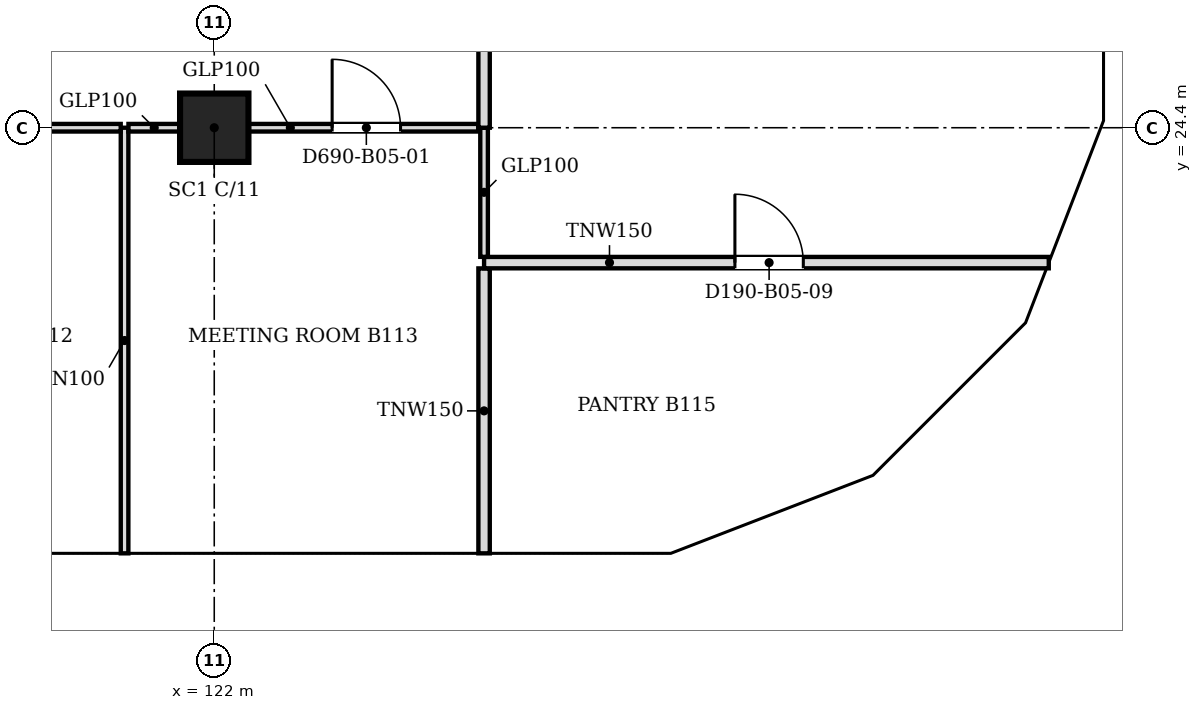
"""IFC4 building model, lengths in metres.
Left out: names, types, materials, properties, quantities, classifications, styles, units other than length and angle.
Written with IfcOpenShell. Run it as: python <this file> out.ifc"""

import sys

from ifc_helpers import new_model, si_unit, direction, frame, frame_2d, origin, origin_2d, place, context, subcontext, project, spatial, polyline, rectangle, outline, extrude, faceted_brep, source, transform, mapped, element, fill, save


model = new_model("IFC4")
c1 = context("Model", 3, precision=1e-05, world=origin(), true_north=direction((0.0, 1.0)))
c2 = subcontext(c1, "Body", "Model", "MODEL_VIEW")
j1 = project(units=[si_unit("LENGTHUNIT", "METRE"), si_unit("PLANEANGLEUNIT", "RADIAN")], contexts=[c1])
p1 = place(None, origin())
s1 = spatial("IfcSite", under=j1, at=p1, CompositionType="ELEMENT")
p2 = place(p1, origin())
s2 = spatial("IfcBuilding", under=s1, at=p2, CompositionType="ELEMENT")
p3 = place(p2, frame((0.0, 0.0, 52.4)))
s3 = spatial("IfcBuildingStorey", under=s2, at=p3, CompositionType="ELEMENT", Elevation=52.4)
p4 = place(p3, frame((122.0, 24.4, 0.0), z_axis=(0.0, 0.0, 1.0), x_axis=(1.0, 0.0, 0.0)))
e1 = element("IfcColumn", 1, at=p4, inside=s3, PredefinedType="COLUMN", context=c2, shape_type="SweptSolid", body=[
    extrude(rectangle(XDim=0.9, YDim=0.9, at=origin_2d()), origin(), (0.0, 0.0, 1.0), 3.6),
])
m1 = source(origin(), c2, "Body", "SweptSolid", [
    extrude(outline(polyline([(3.05, 0.0), (6.1, 3.8), (3.05, 7.6), (0.0, 3.8), (3.05, 0.0)])), frame((0.0, 0.25, 0.0), z_axis=(0.0, -1.0, 0.0), x_axis=(1.0, 0.0, 0.0)), (0.0, 0.0, 1.0), 0.5),
])
p5 = place(p3, frame((115.9, 18.55, -3.8), z_axis=(0.0, 0.0, 1.0), x_axis=(1.0, 0.0, 0.0)))
e2 = element("IfcWall", 2, at=p5, inside=s3, PredefinedType="SOLIDWALL", context=c2, shape_type="MappedRepresentation", body=[
    mapped(m1, transform((0.0, 0.0, 0.0), scale=1.0)),
])
m2 = source(origin(), c2, "Body", "SweptSolid", [
    extrude(outline(polyline([(3.05, 0.399), (5.78, 3.8), (3.05, 7.2), (0.321, 3.8), (3.05, 0.399)])), frame((0.0, 0.26, 0.0), z_axis=(0.0, -1.0, 0.0), x_axis=(1.0, 0.0, 0.0)), (0.0, 0.0, 1.0), 0.52),
])
p6 = place(p5, origin())
e3 = element("IfcOpeningElement", 3, at=p6, cuts=e2, PredefinedType="OPENING", context=c2, shape_type="MappedRepresentation", body=[
    mapped(m2, transform((0.0, 0.0, 0.0), scale=1.0)),
])
m3 = source(origin(), c2, "Body", "Brep", [
    faceted_brep([(3.05, -0.25, 0.0), (6.053, -0.25, 3.8), (3.05, -0.25, 7.6), (0.0, -0.25, 3.8), (0.0, 0.25, 3.8), (3.05, 0.25, 7.6), (6.007, 0.25, 3.859), (6.007, 0.25, 3.741), (3.05, 0.25, 0.0), (6.053, 0.0, 3.8)], [[[0, 1, 2, 3]], [[4, 5, 6, 7, 8]], [[8, 7, 9, 1, 0]], [[6, 5, 2, 1, 9]], [[5, 4, 3, 2]], [[4, 8, 0, 3]], [[9, 7, 6]]]),
])
p7 = place(p3, frame((122.0, 18.55, -3.8), z_axis=(0.0, 0.0, 1.0), x_axis=(1.0, 0.0, 0.0)))
e4 = element("IfcWall", 4, at=p7, inside=s3, PredefinedType="SOLIDWALL", context=c2, shape_type="MappedRepresentation", body=[
    mapped(m3, transform((0.0, 0.0, 0.0), scale=1.0)),
])
m4 = source(origin(), c2, "Body", "SweptSolid", [
    extrude(outline(polyline([(3.049, 0.401), (5.735, 3.8), (3.049, 7.199), (0.321, 3.8), (3.049, 0.401)])), frame((0.0, 0.26, 0.0), z_axis=(0.0, -1.0, 0.0), x_axis=(1.0, 0.0, 0.0)), (0.0, 0.0, 1.0), 0.52),
])
p8 = place(p7, origin())
e5 = element("IfcOpeningElement", 5, at=p8, cuts=e4, PredefinedType="OPENING", context=c2, shape_type="MappedRepresentation", body=[
    mapped(m4, transform((0.0, 0.0, 0.0), scale=1.0)),
])
m5 = source(origin(), c2, "Body", "Brep", [
    faceted_brep([(2.95, -0.25, 0.0), (3.003, -0.25, 0.068), (3.003, -0.25, 7.531), (2.95, -0.25, 7.6), (0.0, -0.25, 3.8), (0.047, 0.25, 3.86), (2.898, 0.25, 7.532), (2.898, 0.25, 0.068), (0.047, 0.25, 3.74), (2.95, 0.0, 0.0), (2.95, 0.0, 7.6), (0.0, 0.0, 3.8)], [[[0, 1, 2, 3, 4]], [[5, 6, 7, 8]], [[1, 0, 9]], [[10, 3, 2]], [[6, 5, 11, 4, 3, 10]], [[8, 7, 9, 0, 4, 11]], [[8, 11, 5]], [[1, 9, 7, 6, 10, 2]]]),
])
p9 = place(p3, frame((128.053, 18.55, -3.8), z_axis=(0.0, 0.0, 1.0), x_axis=(0.933007896601, 0.359855894603, 0.0)))
e6 = element("IfcWall", 6, at=p9, inside=s3, PredefinedType="SOLIDWALL", context=c2, shape_type="MappedRepresentation", body=[
    mapped(m5, transform((0.0, 0.0, 0.0), scale=1.0)),
])
m6 = source(origin(), c2, "Body", "SweptSolid", [
    extrude(outline(polyline([(2.75, 6.935), (0.316, 3.8), (2.75, 0.665), (2.75, 6.935)])), frame((0.0, 0.26, 0.0), z_axis=(0.0, -1.0, 0.0), x_axis=(1.0, 0.0, 0.0)), (0.0, 0.0, 1.0), 0.52),
])
p10 = place(p9, origin())
e7 = element("IfcOpeningElement", 7, at=p10, cuts=e6, PredefinedType="OPENING", context=c2, shape_type="MappedRepresentation", body=[
    mapped(m6, transform((0.0, 0.0, 0.0), scale=1.0)),
])
m7 = source(origin(), c2, "Body", "Brep", [
    faceted_brep([(0.053, -0.25, 0.0), (2.997, -0.25, 3.8), (0.053, -0.25, 7.6), (0.0, -0.25, 7.532), (0.0, -0.25, 0.068), (0.106, 0.25, 7.531), (2.944, 0.25, 3.868), (2.944, 0.25, 3.732), (0.106, 0.25, 0.068), (2.997, 0.0, 3.8), (0.053, 0.0, 0.0), (0.053, 0.0, 7.6)], [[[0, 1, 2, 3, 4]], [[5, 6, 7, 8]], [[8, 7, 9, 1, 0, 10]], [[6, 5, 11, 2, 1, 9]], [[3, 2, 11]], [[10, 0, 4]], [[8, 10, 4, 3, 11, 5]], [[9, 7, 6]]]),
])
p11 = place(p3, frame((130.769, 19.574, -3.8), z_axis=(0.0, 0.0, 1.0), x_axis=(0.707106781187, 0.707106781187, 0.0)))
e8 = element("IfcWall", 8, at=p11, inside=s3, PredefinedType="SOLIDWALL", context=c2, shape_type="MappedRepresentation", body=[
    mapped(m7, transform((0.0, 0.0, 0.0), scale=1.0)),
])
m8 = source(origin(), c2, "Body", "SweptSolid", [
    extrude(outline(polyline([(0.253, 0.666), (2.681, 3.8), (0.253, 6.934), (0.253, 0.666)])), frame((0.0, 0.26, 0.0), z_axis=(0.0, -1.0, 0.0), x_axis=(1.0, 0.0, 0.0)), (0.0, 0.0, 1.0), 0.52),
])
p12 = place(p11, origin())
e9 = element("IfcOpeningElement", 9, at=p12, cuts=e8, PredefinedType="OPENING", context=c2, shape_type="MappedRepresentation", body=[
    mapped(m8, transform((0.0, 0.0, 0.0), scale=1.0)),
])
m9 = source(origin(), c2, "Body", "Brep", [
    faceted_brep([(2.95, -0.25, 0.0), (2.997, -0.25, 0.059), (2.997, -0.25, 7.541), (2.95, -0.25, 7.6), (0.0, -0.25, 3.8), (0.053, 0.25, 3.868), (2.904, 0.25, 7.54), (2.904, 0.25, 0.06), (0.053, 0.25, 3.732), (2.95, 0.0, 0.0), (2.95, 0.0, 7.6), (0.0, 0.0, 3.8)], [[[0, 1, 2, 3, 4]], [[5, 6, 7, 8]], [[1, 0, 9]], [[10, 3, 2]], [[6, 5, 11, 4, 3, 10]], [[8, 7, 9, 0, 4, 11]], [[8, 11, 5]], [[1, 9, 7, 6, 10, 2]]]),
])
p13 = place(p3, frame((132.888, 21.694, -3.8), z_axis=(0.0, 0.0, 1.0), x_axis=(0.359901446078, 0.932990326376, 0.0)))
e10 = element("IfcWall", 10, at=p13, inside=s3, PredefinedType="SOLIDWALL", context=c2, shape_type="MappedRepresentation", body=[
    mapped(m9, transform((0.0, 0.0, 0.0), scale=1.0)),
])
p14 = place(p13, origin())
e11 = element("IfcOpeningElement", 11, at=p14, cuts=e10, PredefinedType="OPENING", context=c2, shape_type="MappedRepresentation", body=[
    mapped(m6, transform((0.0, 0.0, 0.0), scale=1.0)),
])
m10 = source(origin(), c2, "Body", "Brep", [
    faceted_brep([(0.047, -0.25, 0.0), (3.05, -0.25, 3.8), (0.047, -0.25, 7.6), (0.0, -0.25, 7.54), (0.0, -0.25, 0.06), (0.093, 0.25, 7.541), (3.05, 0.25, 3.8), (0.093, 0.25, 0.059), (0.047, 0.0, 0.0), (0.047, 0.0, 7.6)], [[[0, 1, 2, 3, 4]], [[5, 6, 7]], [[7, 6, 1, 0, 8]], [[6, 5, 9, 2, 1]], [[3, 2, 9]], [[8, 0, 4]], [[7, 8, 4, 3, 9, 5]]]),
])
p15 = place(p3, frame((133.95, 24.4, -3.8), z_axis=(0.0, 0.0, 1.0), x_axis=(0.0, 1.0, 0.0)))
e12 = element("IfcWall", 12, at=p15, inside=s3, PredefinedType="SOLIDWALL", context=c2, shape_type="MappedRepresentation", body=[
    mapped(m10, transform((0.0, 0.0, 0.0), scale=1.0)),
])
m11 = source(origin(), c2, "Body", "SweptSolid", [
    extrude(outline(polyline([(0.247, 0.656), (2.731, 3.8), (0.247, 6.944), (0.247, 0.656)])), frame((0.0, 0.26, 0.0), z_axis=(0.0, -1.0, 0.0), x_axis=(1.0, 0.0, 0.0)), (0.0, 0.0, 1.0), 0.52),
])
p16 = place(p15, origin())
e13 = element("IfcOpeningElement", 13, at=p16, cuts=e12, PredefinedType="OPENING", context=c2, shape_type="MappedRepresentation", body=[
    mapped(m11, transform((0.0, 0.0, 0.0), scale=1.0)),
])
p17 = place(p2, frame((0.0, 0.0, 56.2)))
s4 = spatial("IfcBuildingStorey", under=s2, at=p17, CompositionType="ELEMENT", Elevation=56.2)
m12 = source(origin(), c2, "Body", "SweptSolid", [
    extrude(outline(polyline([(3.05, 0.0), (6.1, 3.8), (3.05, 7.6), (0.0, 3.8), (3.05, 0.0)])), frame((0.0, 0.25, 0.0), z_axis=(0.0, -1.0, 0.0), x_axis=(1.0, 0.0, 0.0)), (0.0, 0.0, 1.0), 0.5),
])
p18 = place(p17, frame((118.95, 18.55, -3.8), z_axis=(0.0, 0.0, 1.0), x_axis=(1.0, 0.0, 0.0)))
e14 = element("IfcWall", 14, at=p18, inside=s4, PredefinedType="SOLIDWALL", context=c2, shape_type="MappedRepresentation", body=[
    mapped(m12, transform((0.0, 0.0, 0.0), scale=1.0)),
])
m13 = source(origin(), c2, "Body", "SweptSolid", [
    extrude(outline(polyline([(3.05, 0.399), (5.78, 3.8), (3.05, 7.201), (0.321, 3.8), (3.05, 0.399)])), frame((0.0, 0.26, 0.0), z_axis=(0.0, -1.0, 0.0), x_axis=(1.0, 0.0, 0.0)), (0.0, 0.0, 1.0), 0.52),
])
p19 = place(p18, origin())
e15 = element("IfcOpeningElement", 15, at=p19, cuts=e14, PredefinedType="OPENING", context=c2, shape_type="MappedRepresentation", body=[
    mapped(m13, transform((0.0, 0.0, 0.0), scale=1.0)),
])
m14 = source(origin(), c2, "Body", "Brep", [
    faceted_brep([(3.003, -0.25, 0.0), (3.05, -0.25, 0.06), (3.05, -0.25, 7.54), (3.003, -0.25, 7.6), (0.0, -0.25, 3.8), (0.0, 0.25, 3.8), (2.957, 0.25, 7.541), (2.957, 0.25, 0.059), (3.003, 0.0, 0.0), (3.003, 0.0, 7.6)], [[[0, 1, 2, 3, 4]], [[5, 6, 7]], [[1, 0, 8]], [[9, 3, 2]], [[6, 5, 4, 3, 9]], [[5, 7, 8, 0, 4]], [[1, 8, 7, 6, 9, 2]]]),
])
p20 = place(p17, frame((125.05, 18.55, -3.8), z_axis=(0.0, 0.0, 1.0), x_axis=(1.0, 0.0, 0.0)))
e16 = element("IfcWall", 16, at=p20, inside=s4, PredefinedType="SOLIDWALL", context=c2, shape_type="MappedRepresentation", body=[
    mapped(m14, transform((0.0, 0.0, 0.0), scale=1.0)),
])
m15 = source(origin(), c2, "Body", "SweptSolid", [
    extrude(outline(polyline([(2.803, 6.944), (0.319, 3.8), (2.803, 0.656), (2.803, 6.944)])), frame((0.0, 0.26, 0.0), z_axis=(0.0, -1.0, 0.0), x_axis=(1.0, 0.0, 0.0)), (0.0, 0.0, 1.0), 0.52),
])
p21 = place(p20, origin())
e17 = element("IfcOpeningElement", 17, at=p21, cuts=e16, PredefinedType="OPENING", context=c2, shape_type="MappedRepresentation", body=[
    mapped(m15, transform((0.0, 0.0, 0.0), scale=1.0)),
])
m16 = source(origin(), c2, "Body", "Brep", [
    faceted_brep([(0.047, -0.25, 0.0), (2.997, -0.25, 3.8), (0.047, -0.25, 7.6), (0.0, -0.25, 7.541), (0.0, -0.25, 0.059), (0.093, 0.25, 7.54), (2.944, 0.25, 3.868), (2.944, 0.25, 3.732), (0.093, 0.25, 0.06), (2.997, 0.0, 3.8), (0.047, 0.0, 0.0), (0.047, 0.0, 7.6)], [[[0, 1, 2, 3, 4]], [[5, 6, 7, 8]], [[8, 7, 9, 1, 0, 10]], [[6, 5, 11, 2, 1, 9]], [[3, 2, 11]], [[10, 0, 4]], [[8, 10, 4, 3, 11, 5]], [[9, 7, 6]]]),
])
p22 = place(p17, frame((128.01, 18.533, -3.8), z_axis=(0.0, 0.0, 1.0), x_axis=(0.932990326376, 0.359901446078, 0.0)))
e18 = element("IfcWall", 18, at=p22, inside=s4, PredefinedType="SOLIDWALL", context=c2, shape_type="MappedRepresentation", body=[
    mapped(m16, transform((0.0, 0.0, 0.0), scale=1.0)),
])
m17 = source(origin(), c2, "Body", "SweptSolid", [
    extrude(outline(polyline([(0.247, 0.665), (2.681, 3.8), (0.247, 6.935), (0.247, 0.665)])), frame((0.0, 0.26, 0.0), z_axis=(0.0, -1.0, 0.0), x_axis=(1.0, 0.0, 0.0)), (0.0, 0.0, 1.0), 0.52),
])
p23 = place(p22, origin())
e19 = element("IfcOpeningElement", 19, at=p23, cuts=e18, PredefinedType="OPENING", context=c2, shape_type="MappedRepresentation", body=[
    mapped(m17, transform((0.0, 0.0, 0.0), scale=1.0)),
])
m18 = source(origin(), c2, "Body", "Brep", [
    faceted_brep([(2.944, -0.25, 0.0), (2.997, -0.25, 0.068), (2.997, -0.25, 7.532), (2.944, -0.25, 7.6), (0.0, -0.25, 3.8), (0.053, 0.25, 3.868), (2.891, 0.25, 7.532), (2.891, 0.25, 0.068), (0.053, 0.25, 3.732), (2.944, 0.0, 0.0), (2.944, 0.0, 7.6), (0.0, 0.0, 3.8)], [[[0, 1, 2, 3, 4]], [[5, 6, 7, 8]], [[1, 0, 9]], [[10, 3, 2]], [[6, 5, 11, 4, 3, 10]], [[8, 7, 9, 0, 4, 11]], [[8, 11, 5]], [[1, 9, 7, 6, 10, 2]]]),
])
p24 = place(p17, frame((130.806, 19.612, -3.8), z_axis=(0.0, 0.0, 1.0), x_axis=(0.707106781187, 0.707106781187, 0.0)))
e20 = element("IfcWall", 20, at=p24, inside=s4, PredefinedType="SOLIDWALL", context=c2, shape_type="MappedRepresentation", body=[
    mapped(m18, transform((0.0, 0.0, 0.0), scale=1.0)),
])
m19 = source(origin(), c2, "Body", "SweptSolid", [
    extrude(outline(polyline([(2.744, 6.934), (0.316, 3.8), (2.744, 0.667), (2.744, 6.934)])), frame((0.0, 0.26, 0.0), z_axis=(0.0, -1.0, 0.0), x_axis=(1.0, 0.0, 0.0)), (0.0, 0.0, 1.0), 0.52),
])
p25 = place(p24, origin())
e21 = element("IfcOpeningElement", 21, at=p25, cuts=e20, PredefinedType="OPENING", context=c2, shape_type="MappedRepresentation", body=[
    mapped(m19, transform((0.0, 0.0, 0.0), scale=1.0)),
])
m20 = source(origin(), c2, "Body", "Brep", [
    faceted_brep([(0.053, -0.25, 0.0), (3.003, -0.25, 3.8), (0.053, -0.25, 7.6), (0.0, -0.25, 7.532), (0.0, -0.25, 0.068), (0.106, 0.25, 7.532), (2.957, 0.25, 3.86), (2.957, 0.25, 3.74), (0.106, 0.25, 0.068), (3.003, 0.0, 3.8), (0.053, 0.0, 0.0), (0.053, 0.0, 7.6)], [[[0, 1, 2, 3, 4]], [[5, 6, 7, 8]], [[8, 7, 9, 1, 0, 10]], [[6, 5, 11, 2, 1, 9]], [[3, 2, 11]], [[10, 0, 4]], [[8, 10, 4, 3, 11, 5]], [[9, 7, 6]]]),
])
p26 = place(p17, frame((132.869, 21.644, -3.8), z_axis=(0.0, 0.0, 1.0), x_axis=(0.359855894603, 0.933007896601, 0.0)))
e22 = element("IfcWall", 22, at=p26, inside=s4, PredefinedType="SOLIDWALL", context=c2, shape_type="MappedRepresentation", body=[
    mapped(m20, transform((0.0, 0.0, 0.0), scale=1.0)),
])
m21 = source(origin(), c2, "Body", "SweptSolid", [
    extrude(outline(polyline([(0.253, 0.665), (2.687, 3.8), (0.253, 6.935), (0.253, 0.665)])), frame((0.0, 0.26, 0.0), z_axis=(0.0, -1.0, 0.0), x_axis=(1.0, 0.0, 0.0)), (0.0, 0.0, 1.0), 0.52),
])
p27 = place(p26, origin())
e23 = element("IfcOpeningElement", 23, at=p27, cuts=e22, PredefinedType="OPENING", context=c2, shape_type="MappedRepresentation", body=[
    mapped(m21, transform((0.0, 0.0, 0.0), scale=1.0)),
])
m22 = source(origin(), c2, "Body", "Brep", [
    faceted_brep([(3.003, -0.25, 0.0), (6.053, -0.25, 3.8), (3.003, -0.25, 7.6), (0.0, -0.25, 3.8), (0.047, 0.25, 3.859), (3.003, 0.25, 7.6), (6.053, 0.25, 3.8), (3.003, 0.25, 0.0), (0.047, 0.25, 3.741), (0.0, 0.0, 3.8)], [[[0, 1, 2, 3]], [[4, 5, 6, 7, 8]], [[7, 6, 1, 0]], [[6, 5, 2, 1]], [[5, 4, 9, 3, 2]], [[8, 7, 0, 3, 9]], [[8, 9, 4]]]),
])
p28 = place(p17, frame((133.95, 24.447, -3.8), z_axis=(0.0, 0.0, 1.0), x_axis=(0.0, 1.0, 0.0)))
e24 = element("IfcWall", 24, at=p28, inside=s4, PredefinedType="SOLIDWALL", context=c2, shape_type="MappedRepresentation", body=[
    mapped(m22, transform((0.0, 0.0, 0.0), scale=1.0)),
])
m23 = source(origin(), c2, "Body", "SweptSolid", [
    extrude(outline(polyline([(3.005, 0.401), (5.733, 3.8), (3.005, 7.199), (0.319, 3.8), (3.005, 0.401)])), frame((0.0, 0.26, 0.0), z_axis=(0.0, -1.0, 0.0), x_axis=(1.0, 0.0, 0.0)), (0.0, 0.0, 1.0), 0.52),
])
p29 = place(p28, origin())
e25 = element("IfcOpeningElement", 25, at=p29, cuts=e24, PredefinedType="OPENING", context=c2, shape_type="MappedRepresentation", body=[
    mapped(m23, transform((0.0, 0.0, 0.0), scale=1.0)),
])
p30 = place(p3, frame((120.82, 18.8, 0.0), z_axis=(0.0, 0.0, 1.0), x_axis=(0.0, 1.0, 0.0)))
e26 = element("IfcWall", 26, at=p30, inside=s3, PredefinedType="PARTITIONING", context=c2, shape_type="SweptSolid", body=[
    extrude(rectangle(XDim=5.6, YDim=0.1, at=frame_2d((2.8, 0.0))), origin(), (0.0, 0.0, 1.0), 3.067),
])
p31 = place(p3, frame((125.55, 18.8, 0.0), z_axis=(0.0, 0.0, 1.0), x_axis=(0.0, 1.0, 0.0)))
e27 = element("IfcWall", 27, at=p31, inside=s3, PredefinedType="PARTITIONING", context=c2, shape_type="SweptSolid", body=[
    extrude(rectangle(XDim=3.749, YDim=0.15, at=frame_2d((1.875, 0.0))), origin(), (0.0, 0.0, 1.0), 3.067),
])
p32 = place(p3, frame((132.979, 22.625, 0.0), z_axis=(0.0, 0.0, 1.0), x_axis=(-1.0, 0.0, 0.0)))
e28 = element("IfcWall", 28, at=p32, inside=s3, PredefinedType="PARTITIONING", context=c2, shape_type="SweptSolid", body=[
    extrude(rectangle(XDim=7.429, YDim=0.15, at=frame_2d((3.715, 0.0))), origin(), (0.0, 0.0, 1.0), 3.067),
])
m24 = source(origin(), c2, "Body", "SweptSolid", [
    extrude(rectangle(XDim=0.9, YDim=2.1, at=frame_2d((0.45, 1.05))), frame((0.0, 0.085, 0.0), z_axis=(0.0, -1.0, 0.0), x_axis=(1.0, 0.0, 0.0)), (0.0, 0.0, 1.0), 0.17),
])
p33 = place(p32, frame((3.229, 0.0, 0.0)))
e29 = element("IfcOpeningElement", 29, at=p33, cuts=e28, PredefinedType="OPENING", context=c2, shape_type="MappedRepresentation", body=[
    mapped(m24, transform((0.0, 0.0, 0.0), scale=1.0)),
])
p34 = place(p3, frame((125.55, 22.701, 0.0), z_axis=(0.0, 0.0, 1.0), x_axis=(0.0, 1.0, 0.0)))
e30 = element("IfcWall", 30, at=p34, inside=s3, PredefinedType="PARTITIONING", context=c2, shape_type="SweptSolid", body=[
    extrude(rectangle(XDim=1.698, YDim=0.1, at=frame_2d((0.849, 0.0))), origin(), (0.0, 0.0, 1.0), 3.067),
])
p35 = place(p3, frame((120.769, 24.4, 0.0), z_axis=(0.0, 0.0, 1.0), x_axis=(-1.0, 0.0, 0.0)))
e31 = element("IfcWall", 31, at=p35, inside=s3, PredefinedType="PARTITIONING", context=c2, shape_type="SweptSolid", body=[
    extrude(rectangle(XDim=4.293, YDim=0.1, at=frame_2d((2.146, 0.0))), origin(), (0.0, 0.0, 1.0), 3.067),
])
m25 = source(origin(), c2, "Body", "SweptSolid", [
    extrude(rectangle(XDim=0.9, YDim=2.1, at=frame_2d((0.45, 1.05))), frame((0.0, 0.06, 0.0), z_axis=(0.0, -1.0, 0.0), x_axis=(1.0, 0.0, 0.0)), (0.0, 0.0, 1.0), 0.12),
])
p36 = place(p35, frame((1.693, 0.0, 0.0)))
e32 = element("IfcOpeningElement", 32, at=p36, cuts=e31, PredefinedType="OPENING", context=c2, shape_type="MappedRepresentation", body=[
    mapped(m25, transform((0.0, 0.0, 0.0), scale=1.0)),
])
p37 = place(p3, frame((120.871, 24.4, 0.0), z_axis=(0.0, 0.0, 1.0), x_axis=(1.0, 0.0, 0.0)))
e33 = element("IfcWall", 33, at=p37, inside=s3, PredefinedType="PARTITIONING", context=c2, shape_type="SweptSolid", body=[
    extrude(rectangle(XDim=0.678, YDim=0.1, at=frame_2d((0.339, 0.0))), origin(), (0.0, 0.0, 1.0), 3.067),
])
p38 = place(p3, frame((125.474, 24.4, 0.0), z_axis=(0.0, 0.0, 1.0), x_axis=(-1.0, 0.0, 0.0)))
e34 = element("IfcWall", 34, at=p38, inside=s3, PredefinedType="PARTITIONING", context=c2, shape_type="SweptSolid", body=[
    extrude(rectangle(XDim=3.023, YDim=0.1, at=frame_2d((1.512, 0.0))), origin(), (0.0, 0.0, 1.0), 3.067),
])
p39 = place(p38, frame((1.023, 0.0, 0.0)))
e35 = element("IfcOpeningElement", 35, at=p39, cuts=e34, PredefinedType="OPENING", context=c2, shape_type="MappedRepresentation", body=[
    mapped(m25, transform((0.0, 0.0, 0.0), scale=1.0)),
])
p40 = place(p3, frame((125.55, 24.4, 0.0), z_axis=(0.0, 0.0, 1.0), x_axis=(0.0, 1.0, 0.0)))
e36 = element("IfcWall", 36, at=p40, inside=s3, PredefinedType="PARTITIONING", context=c2, shape_type="SweptSolid", body=[
    extrude(rectangle(XDim=10.124, YDim=0.15, at=frame_2d((5.062, 0.0))), origin(), (0.0, 0.0, 1.0), 3.067),
])
m26 = source(origin(), c2, "Body", "SweptSolid", [
    extrude(rectangle(XDim=0.9, YDim=2.1, at=frame_2d((0.45, 1.05))), frame((0.0, 0.025, 0.0), z_axis=(0.0, -1.0, 0.0), x_axis=(1.0, 0.0, 0.0)), (0.0, 0.0, 1.0), 0.05),
])
p41 = place(p39, origin())
e37 = element("IfcDoor", 37, at=p41, inside=s3, OperationType="SINGLE_SWING_RIGHT", PredefinedType="DOOR", context=c2, shape_type="MappedRepresentation", body=[
    mapped(m26, transform((0.0, 0.0, 0.0), scale=1.0)),
])
fill(e35, e37)
p42 = place(p33, origin())
e38 = element("IfcDoor", 38, at=p42, inside=s3, OperationType="SINGLE_SWING_RIGHT", PredefinedType="DOOR", context=c2, shape_type="MappedRepresentation", body=[
    mapped(m26, transform((0.0, 0.0, 0.0), scale=1.0)),
])
fill(e29, e38)
save(model, sys.argv[1])
